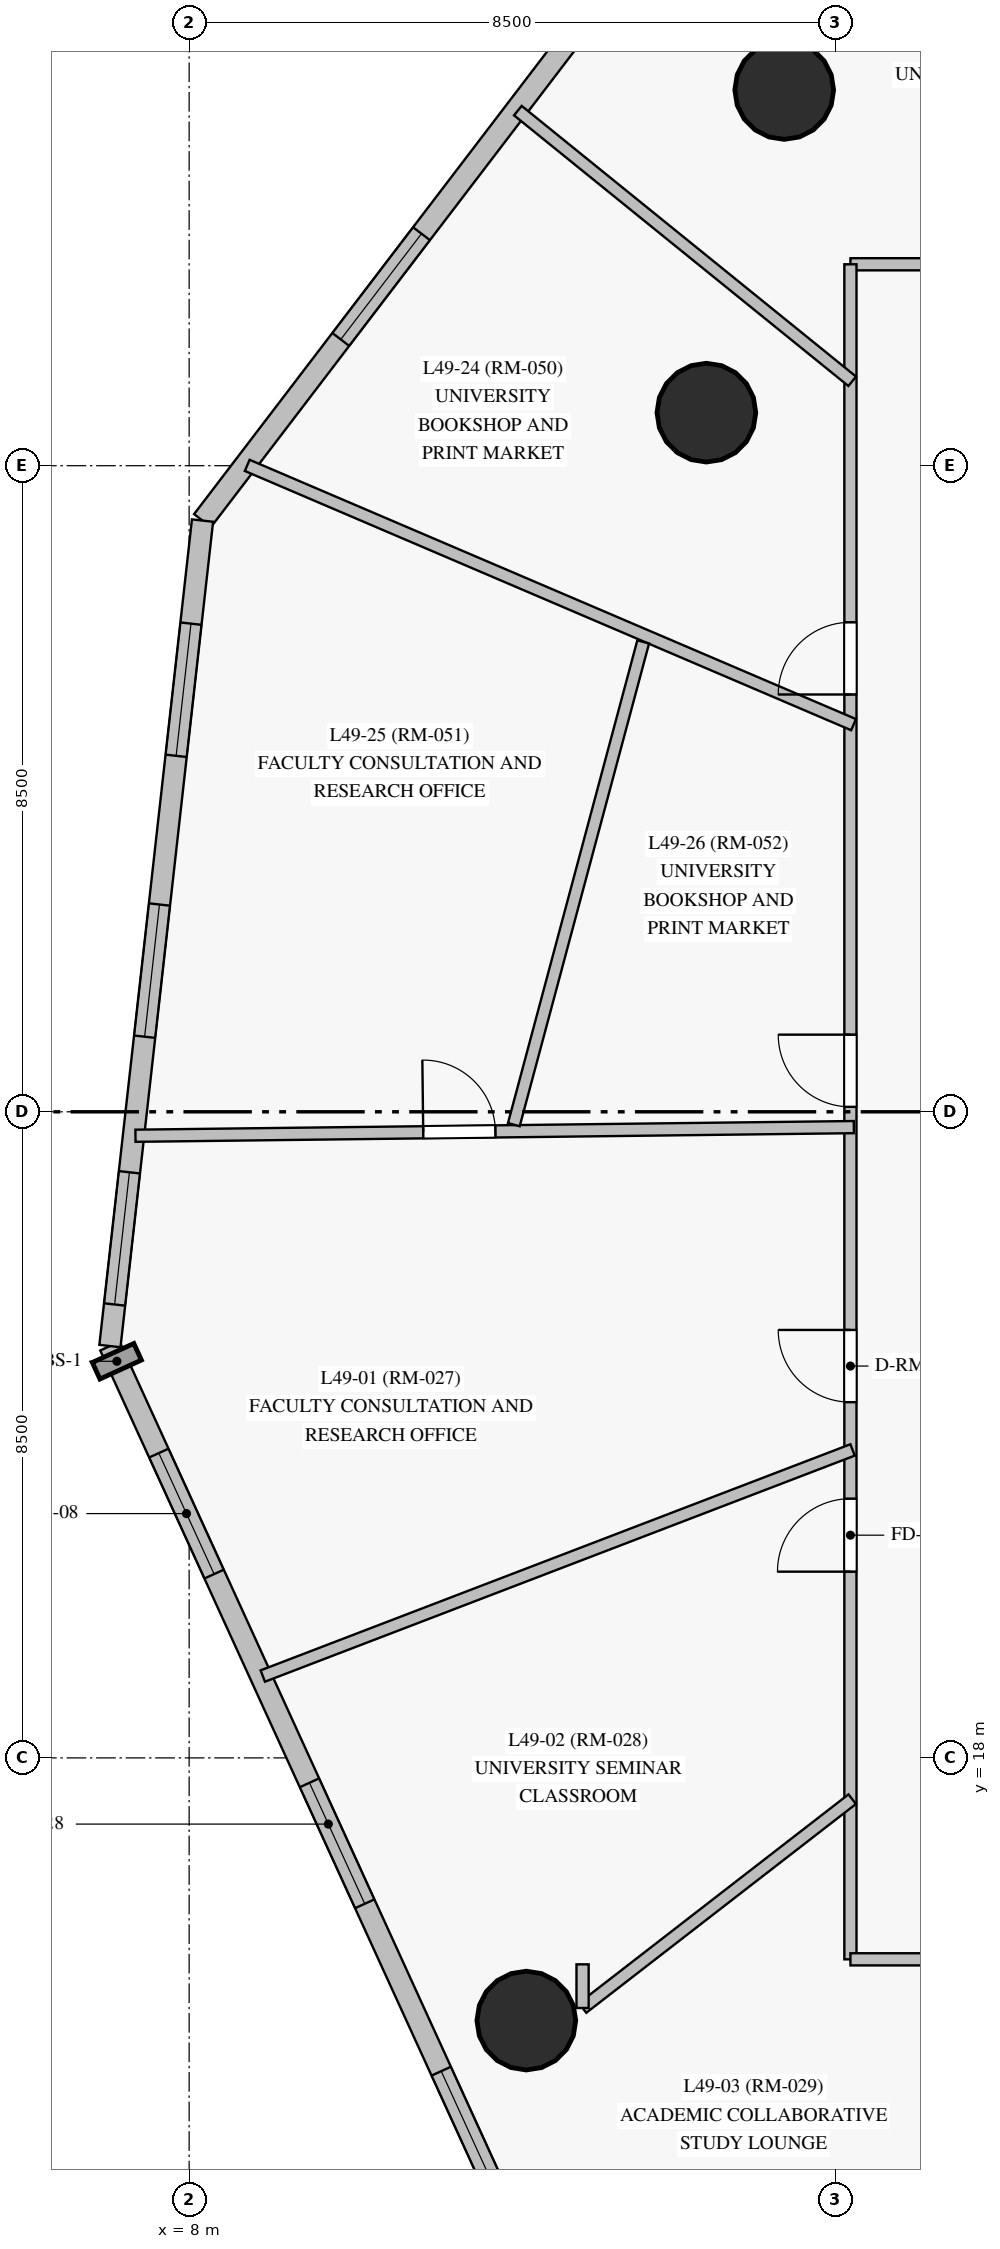
"""IFC4 building model, lengths in metres.
Left out: names, types, materials, properties, quantities, classifications, styles, units other than length and angle.
Written with IfcOpenShell. Run it as: python <this file> out.ifc"""

import sys

from ifc_helpers import new_model, si_unit, direction, frame, frame_2d, origin, origin_with_axes, origin_2d, place, context, subcontext, project, spatial, rectangle, circle, extrude, source, transform, mapped, element, fill, save


model = new_model("IFC4")
c1 = context("Model", 3, precision=1e-05, world=origin(), true_north=direction((0.0, 1.0)))
c2 = subcontext(c1, "Body", "Model", "MODEL_VIEW")
j1 = project(units=[si_unit("LENGTHUNIT", "METRE"), si_unit("PLANEANGLEUNIT", "RADIAN")], contexts=[c1])
p1 = place(None, origin())
s1 = spatial("IfcSite", under=j1, at=p1, CompositionType="ELEMENT")
p2 = place(p1, origin())
s2 = spatial("IfcBuilding", under=s1, at=p2, CompositionType="ELEMENT")
p3 = place(p2, frame((0.0, 0.0, 171.8)))
s3 = spatial("IfcBuildingStorey", under=s2, at=p3, CompositionType="ELEMENT", Elevation=171.8)
m1 = source(origin_with_axes(), c2, "Body", "SweptSolid", [
    extrude(circle(Radius=0.65, at=origin_2d()), origin(), (0.0, 0.0, 1.0), 3.05),
])
for number, where, z_axis, x_axis in (
    (1, (15.829, 39.943, 0.0), (0.0, 0.0, 1.0), (1.0, 0.0, 0.0)),
    (2, (14.805, 35.698, 0.0), (0.0, 0.0, 1.0), (1.0, 0.0, 0.0)),
    (3, (12.436, 14.544, 0.0), (0.0, 0.0, 1.0), (1.0, 0.0, 0.0)),
):
    element("IfcColumn", number, at=place(p3, frame(where, z_axis=z_axis, x_axis=x_axis)), inside=s3, PredefinedType="COLUMN", context=c2, shape_type="MappedRepresentation", body=[
        mapped(m1, transform((0.0, 0.0, 0.0), scale=1.0)),
    ])
p4 = place(p3, frame((6.958, 23.418, 0.0), z_axis=(0.0, 0.0, 1.0), x_axis=(0.415561981729, -0.909564862636, 0.0)))
e4 = element("IfcWall", 4, at=p4, inside=s3, PredefinedType="SOLIDWALL", context=c2, shape_type="SweptSolid", body=[
    extrude(rectangle(XDim=13.828, YDim=0.28, at=frame_2d((6.914, 0.0))), origin(), (0.0, 0.0, 1.0), 2.825),
])
p5 = place(p4, frame((1.548, 0.0, 0.85)))
e5 = element("IfcOpeningElement", 5, at=p5, cuts=e4, PredefinedType="OPENING", context=c2, shape_type="SweptSolid", body=[
    extrude(rectangle(XDim=1.75, YDim=1.65, at=frame_2d((0.875, 0.825))), frame((0.0, 0.15, 0.0), z_axis=(0.0, -1.0, 0.0), x_axis=(1.0, 0.0, 0.0)), (0.0, 0.0, 1.0), 0.3),
])
p6 = place(p4, frame((6.317, 0.0, 0.85)))
e6 = element("IfcOpeningElement", 6, at=p6, cuts=e4, PredefinedType="OPENING", context=c2, shape_type="SweptSolid", body=[
    extrude(rectangle(XDim=1.75, YDim=1.65, at=frame_2d((0.875, 0.825))), frame((0.0, 0.15, 0.0), z_axis=(0.0, -1.0, 0.0), x_axis=(1.0, 0.0, 0.0)), (0.0, 0.0, 1.0), 0.3),
])
p7 = place(p4, frame((10.488, 0.0, 0.85)))
e7 = element("IfcOpeningElement", 7, at=p7, cuts=e4, PredefinedType="OPENING", context=c2, shape_type="SweptSolid", body=[
    extrude(rectangle(XDim=1.75, YDim=1.65, at=frame_2d((0.875, 0.825))), frame((0.0, 0.15, 0.0), z_axis=(0.0, -1.0, 0.0), x_axis=(1.0, 0.0, 0.0)), (0.0, 0.0, 1.0), 0.3),
])
p8 = place(p3, frame((16.566, 45.27, 0.0), z_axis=(0.0, 0.0, 1.0), x_axis=(-0.606755233028, -0.794888726296, 0.0)))
e8 = element("IfcWall", 8, at=p8, inside=s3, PredefinedType="SOLIDWALL", context=c2, shape_type="SweptSolid", body=[
    extrude(rectangle(XDim=13.828, YDim=0.28, at=frame_2d((6.914, 0.0))), origin(), (0.0, 0.0, 1.0), 2.825),
])
p9 = place(p8, frame((2.667, 0.0, 0.85)))
e9 = element("IfcOpeningElement", 9, at=p9, cuts=e8, PredefinedType="OPENING", context=c2, shape_type="SweptSolid", body=[
    extrude(rectangle(XDim=1.75, YDim=1.65, at=frame_2d((0.875, 0.825))), frame((0.0, 0.15, 0.0), z_axis=(0.0, -1.0, 0.0), x_axis=(1.0, 0.0, 0.0)), (0.0, 0.0, 1.0), 0.3),
])
p10 = place(p8, frame((9.08, 0.0, 0.85)))
e10 = element("IfcOpeningElement", 10, at=p10, cuts=e8, PredefinedType="OPENING", context=c2, shape_type="SweptSolid", body=[
    extrude(rectangle(XDim=1.75, YDim=1.65, at=frame_2d((0.875, 0.825))), frame((0.0, 0.15, 0.0), z_axis=(0.0, -1.0, 0.0), x_axis=(1.0, 0.0, 0.0)), (0.0, 0.0, 1.0), 0.3),
])
p11 = place(p3, frame((8.176, 34.278, 0.0), z_axis=(0.0, 0.0, 1.0), x_axis=(-0.111456402668, -0.993769324493, 0.0)))
e11 = element("IfcWall", 11, at=p11, inside=s3, PredefinedType="SOLIDWALL", context=c2, shape_type="SweptSolid", body=[
    extrude(rectangle(XDim=10.928, YDim=0.28, at=frame_2d((5.464, 0.0))), origin(), (0.0, 0.0, 1.0), 2.825),
])
p12 = place(p11, frame((1.364, 0.0, 0.85)))
e12 = element("IfcOpeningElement", 12, at=p12, cuts=e11, PredefinedType="OPENING", context=c2, shape_type="SweptSolid", body=[
    extrude(rectangle(XDim=1.75, YDim=1.65, at=frame_2d((0.875, 0.825))), frame((0.0, 0.15, 0.0), z_axis=(0.0, -1.0, 0.0), x_axis=(1.0, 0.0, 0.0)), (0.0, 0.0, 1.0), 0.3),
])
p13 = place(p11, frame((5.083, 0.0, 0.85)))
e13 = element("IfcOpeningElement", 13, at=p13, cuts=e11, PredefinedType="OPENING", context=c2, shape_type="SweptSolid", body=[
    extrude(rectangle(XDim=1.75, YDim=1.65, at=frame_2d((0.875, 0.825))), frame((0.0, 0.15, 0.0), z_axis=(0.0, -1.0, 0.0), x_axis=(1.0, 0.0, 0.0)), (0.0, 0.0, 1.0), 0.3),
])
p14 = place(p11, frame((8.627, 0.0, 0.85)))
e14 = element("IfcOpeningElement", 14, at=p14, cuts=e11, PredefinedType="OPENING", context=c2, shape_type="SweptSolid", body=[
    extrude(rectangle(XDim=1.75, YDim=1.65, at=frame_2d((0.875, 0.825))), frame((0.0, 0.15, 0.0), z_axis=(0.0, -1.0, 0.0), x_axis=(1.0, 0.0, 0.0)), (0.0, 0.0, 1.0), 0.3),
])
p15 = place(p3, frame((16.7, 37.65, 0.0), z_axis=(0.0, 0.0, 1.0), x_axis=(1.0, 0.0, 0.0)))
e15 = element("IfcWall", 15, at=p15, inside=s3, PredefinedType="PARTITIONING", context=c2, shape_type="SweptSolid", body=[
    extrude(rectangle(XDim=23.5, YDim=0.16, at=frame_2d((11.75, 0.0))), origin(), (0.0, 0.0, 1.0), 2.375),
])
p16 = place(p15, frame((17.15, 0.0, 0.0)))
e16 = element("IfcOpeningElement", 16, at=p16, cuts=e15, PredefinedType="OPENING", context=c2, shape_type="SweptSolid", body=[
    extrude(rectangle(XDim=0.95, YDim=2.15, at=frame_2d((0.475, 1.075))), frame((0.0, 0.09, 0.0), z_axis=(0.0, -1.0, 0.0), x_axis=(1.0, 0.0, 0.0)), (0.0, 0.0, 1.0), 0.18),
])
p17 = place(p15, frame((14.31, 0.0, 0.0)))
e17 = element("IfcOpeningElement", 17, at=p17, cuts=e15, PredefinedType="OPENING", context=c2, shape_type="SweptSolid", body=[
    extrude(rectangle(XDim=0.95, YDim=2.15, at=frame_2d((0.475, 1.075))), frame((0.0, 0.09, 0.0), z_axis=(0.0, -1.0, 0.0), x_axis=(1.0, 0.0, 0.0)), (0.0, 0.0, 1.0), 0.18),
])
p18 = place(p15, frame((11.915, 0.0, 0.0)))
e18 = element("IfcOpeningElement", 18, at=p18, cuts=e15, PredefinedType="OPENING", context=c2, shape_type="SweptSolid", body=[
    extrude(rectangle(XDim=0.95, YDim=2.15, at=frame_2d((0.475, 1.075))), frame((0.0, 0.09, 0.0), z_axis=(0.0, -1.0, 0.0), x_axis=(1.0, 0.0, 0.0)), (0.0, 0.0, 1.0), 0.18),
])
p19 = place(p15, frame((7.75, 0.0, 0.0)))
e19 = element("IfcOpeningElement", 19, at=p19, cuts=e15, PredefinedType="OPENING", context=c2, shape_type="SweptSolid", body=[
    extrude(rectangle(XDim=0.95, YDim=2.15, at=frame_2d((0.475, 1.075))), frame((0.0, 0.09, 0.0), z_axis=(0.0, -1.0, 0.0), x_axis=(1.0, 0.0, 0.0)), (0.0, 0.0, 1.0), 0.18),
])
p20 = place(p15, frame((5.01, 0.0, 0.0)))
e20 = element("IfcOpeningElement", 20, at=p20, cuts=e15, PredefinedType="OPENING", context=c2, shape_type="SweptSolid", body=[
    extrude(rectangle(XDim=0.95, YDim=2.15, at=frame_2d((0.475, 1.075))), frame((0.0, 0.09, 0.0), z_axis=(0.0, -1.0, 0.0), x_axis=(1.0, 0.0, 0.0)), (0.0, 0.0, 1.0), 0.18),
])
p21 = place(p3, frame((16.7, 15.35, 0.0), z_axis=(0.0, 0.0, 1.0), x_axis=(0.0, 1.0, 0.0)))
e21 = element("IfcWall", 21, at=p21, inside=s3, PredefinedType="PARTITIONING", context=c2, shape_type="SweptSolid", body=[
    extrude(rectangle(XDim=22.3, YDim=0.16, at=frame_2d((11.15, 0.0))), origin(), (0.0, 0.0, 1.0), 2.275),
])
p22 = place(p21, frame((7.33, 0.0, 0.0)))
e22 = element("IfcOpeningElement", 22, at=p22, cuts=e21, PredefinedType="OPENING", context=c2, shape_type="SweptSolid", body=[
    extrude(rectangle(XDim=0.95, YDim=2.15, at=frame_2d((0.475, 1.075))), frame((0.0, 0.09, 0.0), z_axis=(0.0, -1.0, 0.0), x_axis=(1.0, 0.0, 0.0)), (0.0, 0.0, 1.0), 0.18),
])
p23 = place(p21, frame((5.1, 0.0, 0.0)))
e23 = element("IfcOpeningElement", 23, at=p23, cuts=e21, PredefinedType="OPENING", context=c2, shape_type="SweptSolid", body=[
    extrude(rectangle(XDim=0.96, YDim=2.15, at=frame_2d((0.48, 1.075))), frame((0.0, 0.09, 0.0), z_axis=(0.0, -1.0, 0.0), x_axis=(1.0, 0.0, 0.0)), (0.0, 0.0, 1.0), 0.18),
])
p24 = place(p21, frame((16.64, 0.0, 0.0)))
e24 = element("IfcOpeningElement", 24, at=p24, cuts=e21, PredefinedType="OPENING", context=c2, shape_type="SweptSolid", body=[
    extrude(rectangle(XDim=0.95, YDim=2.15, at=frame_2d((0.475, 1.075))), frame((0.0, 0.09, 0.0), z_axis=(0.0, -1.0, 0.0), x_axis=(1.0, 0.0, 0.0)), (0.0, 0.0, 1.0), 0.18),
])
p25 = place(p21, frame((11.215, 0.0, 0.0)))
e25 = element("IfcOpeningElement", 25, at=p25, cuts=e21, PredefinedType="OPENING", context=c2, shape_type="SweptSolid", body=[
    extrude(rectangle(XDim=0.95, YDim=2.15, at=frame_2d((0.475, 1.075))), frame((0.0, 0.09, 0.0), z_axis=(0.0, -1.0, 0.0), x_axis=(1.0, 0.0, 0.0)), (0.0, 0.0, 1.0), 0.18),
])
p26 = place(p3, frame((27.55, 15.35, 0.0), z_axis=(0.0, 0.0, 1.0), x_axis=(-1.0, 0.0, 0.0)))
e26 = element("IfcWall", 26, at=p26, inside=s3, PredefinedType="PARTITIONING", context=c2, shape_type="SweptSolid", body=[
    extrude(rectangle(XDim=10.85, YDim=0.16, at=frame_2d((5.425, 0.0))), origin(), (0.0, 0.0, 1.0), 2.375),
])
p27 = place(p26, frame((7.663, 0.0, 0.0)))
e27 = element("IfcOpeningElement", 27, at=p27, cuts=e26, PredefinedType="OPENING", context=c2, shape_type="SweptSolid", body=[
    extrude(rectangle(XDim=0.95, YDim=2.15, at=frame_2d((0.475, 1.075))), frame((0.0, 0.09, 0.0), z_axis=(0.0, -1.0, 0.0), x_axis=(1.0, 0.0, 0.0)), (0.0, 0.0, 1.0), 0.18),
])
p28 = place(p26, frame((5.59, 0.0, 0.0)))
e28 = element("IfcOpeningElement", 28, at=p28, cuts=e26, PredefinedType="OPENING", context=c2, shape_type="SweptSolid", body=[
    extrude(rectangle(XDim=0.95, YDim=2.15, at=frame_2d((0.475, 1.075))), frame((0.0, 0.09, 0.0), z_axis=(0.0, -1.0, 0.0), x_axis=(1.0, 0.0, 0.0)), (0.0, 0.0, 1.0), 0.18),
])
p29 = place(p26, frame((3.323, 0.0, 0.0)))
e29 = element("IfcOpeningElement", 29, at=p29, cuts=e26, PredefinedType="OPENING", context=c2, shape_type="SweptSolid", body=[
    extrude(rectangle(XDim=0.95, YDim=2.15, at=frame_2d((0.475, 1.075))), frame((0.0, 0.09, 0.0), z_axis=(0.0, -1.0, 0.0), x_axis=(1.0, 0.0, 0.0)), (0.0, 0.0, 1.0), 0.18),
])
p30 = place(p26, frame((1.597, 0.0, 0.0)))
e30 = element("IfcOpeningElement", 30, at=p30, cuts=e26, PredefinedType="OPENING", context=c2, shape_type="SweptSolid", body=[
    extrude(rectangle(XDim=0.95, YDim=2.15, at=frame_2d((0.475, 1.075))), frame((0.0, 0.09, 0.0), z_axis=(0.0, -1.0, 0.0), x_axis=(1.0, 0.0, 0.0)), (0.0, 0.0, 1.0), 0.18),
])
p31 = place(p3, frame((7.294, 26.185, 0.0), z_axis=(0.0, 0.0, 1.0), x_axis=(0.999927555833, 0.012036739022, 0.0)))
e31 = element("IfcWall", 31, at=p31, inside=s3, PredefinedType="PARTITIONING", context=c2, shape_type="SweptSolid", body=[
    extrude(rectangle(XDim=9.452, YDim=0.16, at=frame_2d((4.726, 0.0))), origin(), (0.0, 0.0, 1.0), 2.825),
])
p32 = place(p31, frame((3.786, 0.0, 0.0)))
e32 = element("IfcOpeningElement", 32, at=p32, cuts=e31, PredefinedType="OPENING", context=c2, shape_type="SweptSolid", body=[
    extrude(rectangle(XDim=0.95, YDim=2.15, at=frame_2d((0.475, 1.075))), frame((0.0, 0.09, 0.0), z_axis=(0.0, -1.0, 0.0), x_axis=(1.0, 0.0, 0.0)), (0.0, 0.0, 1.0), 0.18),
])
p33 = place(p3, frame((16.741, 31.593, 0.0), z_axis=(0.0, 0.0, 1.0), x_axis=(-0.919476562522, 0.393144821882, 0.0)))
e33 = element("IfcWall", 33, at=p33, inside=s3, PredefinedType="PARTITIONING", context=c2, shape_type="SweptSolid", body=[
    extrude(rectangle(XDim=8.676, YDim=0.16, at=frame_2d((4.338, 0.0))), origin(), (0.0, 0.0, 1.0), 2.825),
])
p34 = place(p3, frame((16.728, 22.052, 0.0), z_axis=(0.0, 0.0, 1.0), x_axis=(-0.933733515025, -0.357968885405, 0.0)))
e34 = element("IfcWall", 34, at=p34, inside=s3, PredefinedType="PARTITIONING", context=c2, shape_type="SweptSolid", body=[
    extrude(rectangle(XDim=8.31, YDim=0.16, at=frame_2d((4.155, 0.0))), origin(), (0.0, 0.0, 1.0), 2.825),
])
p35 = place(p3, frame((20.699, 15.387, 0.0), z_axis=(0.0, 0.0, 1.0), x_axis=(-0.570926088809, -0.821001462311, 0.0)))
e35 = element("IfcWall", 35, at=p35, inside=s3, PredefinedType="PARTITIONING", context=c2, shape_type="SweptSolid", body=[
    extrude(rectangle(XDim=6.513, YDim=0.16, at=frame_2d((3.256, 0.0))), origin(), (0.0, 0.0, 1.0), 2.825),
])
p36 = place(p3, frame((13.974, 32.682, 0.0), z_axis=(0.0, 0.0, 1.0), x_axis=(-0.258829498698, -0.965923025196, 0.0)))
e36 = element("IfcWall", 36, at=p36, inside=s3, PredefinedType="PARTITIONING", context=c2, shape_type="SweptSolid", body=[
    extrude(rectangle(XDim=6.575, YDim=0.16, at=frame_2d((3.288, 0.0))), origin(), (0.0, 0.0, 1.0), 2.275),
])
p37 = place(p3, frame((16.723, 36.111, 0.0), z_axis=(0.0, 0.0, 1.0), x_axis=(-0.777265966674, 0.629172168051, 0.0)))
e37 = element("IfcWall", 37, at=p37, inside=s3, PredefinedType="PARTITIONING", context=c2, shape_type="SweptSolid", body=[
    extrude(rectangle(XDim=5.659, YDim=0.16, at=frame_2d((2.83, 0.0))), origin(), (0.0, 0.0, 1.0), 2.825),
])
p38 = place(p3, frame((16.724, 17.457, 0.0), z_axis=(0.0, 0.0, 1.0), x_axis=(-0.79066592858, -0.612247816969, 0.0)))
e38 = element("IfcWall", 38, at=p38, inside=s3, PredefinedType="PARTITIONING", context=c2, shape_type="SweptSolid", body=[
    extrude(rectangle(XDim=4.487, YDim=0.16, at=frame_2d((2.243, 0.0))), origin(), (0.0, 0.0, 1.0), 2.275),
])
p39 = place(p3, frame((13.176, 14.71, 0.0), z_axis=(0.0, 0.0, 1.0), x_axis=(0.0, 1.0, 0.0)))
e39 = element("IfcWall", 39, at=p39, inside=s3, PredefinedType="PARTITIONING", context=c2, shape_type="SweptSolid", body=[
    extrude(rectangle(XDim=0.574, YDim=0.16, at=frame_2d((0.287, 0.0))), origin(), (0.0, 0.0, 1.0), 2.275),
])
m2 = source(origin_with_axes(), c2, "Body", "SweptSolid", [
    extrude(rectangle(XDim=1.75, YDim=1.65, at=frame_2d((0.875, 0.825))), frame((0.0, 0.03, 0.0), z_axis=(0.0, -1.0, 0.0), x_axis=(1.0, 0.0, 0.0)), (0.0, 0.0, 1.0), 0.06),
])
p40 = place(p5, origin())
e40 = element("IfcWindow", 40, at=p40, inside=s3, PartitioningType="SINGLE_PANEL", PredefinedType="WINDOW", context=c2, shape_type="MappedRepresentation", body=[
    mapped(m2, transform((0.0, 0.0, 0.0), scale=1.0)),
])
fill(e5, e40)
p41 = place(p6, origin())
e41 = element("IfcWindow", 41, at=p41, inside=s3, PartitioningType="SINGLE_PANEL", PredefinedType="WINDOW", context=c2, shape_type="MappedRepresentation", body=[
    mapped(m2, transform((0.0, 0.0, 0.0), scale=1.0)),
])
fill(e6, e41)
p42 = place(p7, origin())
e42 = element("IfcWindow", 42, at=p42, inside=s3, PartitioningType="SINGLE_PANEL", PredefinedType="WINDOW", context=c2, shape_type="MappedRepresentation", body=[
    mapped(m2, transform((0.0, 0.0, 0.0), scale=1.0)),
])
fill(e7, e42)
p43 = place(p10, origin())
e43 = element("IfcWindow", 43, at=p43, inside=s3, PartitioningType="SINGLE_PANEL", PredefinedType="WINDOW", context=c2, shape_type="MappedRepresentation", body=[
    mapped(m2, transform((0.0, 0.0, 0.0), scale=1.0)),
])
fill(e10, e43)
p44 = place(p12, origin())
e44 = element("IfcWindow", 44, at=p44, inside=s3, PartitioningType="SINGLE_PANEL", PredefinedType="WINDOW", context=c2, shape_type="MappedRepresentation", body=[
    mapped(m2, transform((0.0, 0.0, 0.0), scale=1.0)),
])
fill(e12, e44)
p45 = place(p13, origin())
e45 = element("IfcWindow", 45, at=p45, inside=s3, PartitioningType="SINGLE_PANEL", PredefinedType="WINDOW", context=c2, shape_type="MappedRepresentation", body=[
    mapped(m2, transform((0.0, 0.0, 0.0), scale=1.0)),
])
fill(e13, e45)
p46 = place(p14, origin())
e46 = element("IfcWindow", 46, at=p46, inside=s3, PartitioningType="SINGLE_PANEL", PredefinedType="WINDOW", context=c2, shape_type="MappedRepresentation", body=[
    mapped(m2, transform((0.0, 0.0, 0.0), scale=1.0)),
])
fill(e14, e46)
m3 = source(origin_with_axes(), c2, "Body", "SweptSolid", [
    extrude(rectangle(XDim=0.95, YDim=2.15, at=frame_2d((0.475, 1.075))), frame((0.0, 0.025, 0.0), z_axis=(0.0, -1.0, 0.0), x_axis=(1.0, 0.0, 0.0)), (0.0, 0.0, 1.0), 0.05),
])
p47 = place(p22, origin())
e47 = element("IfcDoor", 47, at=p47, inside=s3, OperationType="SINGLE_SWING_RIGHT", PredefinedType="DOOR", context=c2, shape_type="MappedRepresentation", body=[
    mapped(m3, transform((0.0, 0.0, 0.0), scale=1.0)),
])
fill(e22, e47)
m4 = source(origin_with_axes(), c2, "Body", "SweptSolid", [
    extrude(rectangle(XDim=0.96, YDim=2.15, at=frame_2d((0.48, 1.075))), frame((0.0, 0.025, 0.0), z_axis=(0.0, -1.0, 0.0), x_axis=(1.0, 0.0, 0.0)), (0.0, 0.0, 1.0), 0.05),
])
p48 = place(p23, origin())
e48 = element("IfcDoor", 48, at=p48, inside=s3, OperationType="SINGLE_SWING_LEFT", PredefinedType="DOOR", context=c2, shape_type="MappedRepresentation", body=[
    mapped(m4, transform((0.0, 0.0, 0.0), scale=1.0)),
])
fill(e23, e48)
p49 = place(p24, origin())
e49 = element("IfcDoor", 49, at=p49, inside=s3, OperationType="SINGLE_SWING_LEFT", PredefinedType="DOOR", context=c2, shape_type="MappedRepresentation", body=[
    mapped(m3, transform((0.0, 0.0, 0.0), scale=1.0)),
])
fill(e24, e49)
p50 = place(p25, origin())
e50 = element("IfcDoor", 50, at=p50, inside=s3, OperationType="SINGLE_SWING_RIGHT", PredefinedType="DOOR", context=c2, shape_type="MappedRepresentation", body=[
    mapped(m3, transform((0.0, 0.0, 0.0), scale=1.0)),
])
fill(e25, e50)
p51 = place(p32, origin())
e51 = element("IfcDoor", 51, at=p51, inside=s3, OperationType="SINGLE_SWING_LEFT", PredefinedType="DOOR", context=c2, shape_type="MappedRepresentation", body=[
    mapped(m3, transform((0.0, 0.0, 0.0), scale=1.0)),
])
fill(e32, e51)
save(model, sys.argv[1])
